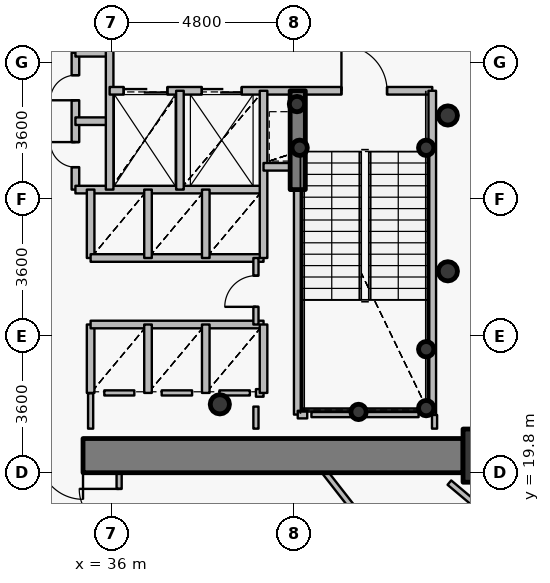
"""IFC4 building model, lengths in metres.
Left out: names, types, materials, properties, quantities, classifications, styles, units other than length and angle.
Written with IfcOpenShell. Run it as: python <this file> out.ifc"""

import sys

from ifc_helpers import new_model, si_unit, direction, frame, frame_2d, origin, origin_2d, place, context, subcontext, project, spatial, rectangle, hollow_circle, extrude, source, transform, mapped, element, fill, save


model = new_model("IFC4")
c1 = context("Model", 3, precision=1e-05, world=origin(), true_north=direction((0.0, 1.0)))
c2 = subcontext(c1, "Body", "Model", "MODEL_VIEW")
j1 = project(units=[si_unit("LENGTHUNIT", "METRE"), si_unit("PLANEANGLEUNIT", "RADIAN")], contexts=[c1])
p1 = place(None, origin())
s1 = spatial("IfcSite", under=j1, at=p1, CompositionType="ELEMENT")
p2 = place(p1, origin())
s2 = spatial("IfcBuilding", under=s1, at=p2, CompositionType="ELEMENT")
p3 = place(p2, frame((0.0, 0.0, 22.8)))
s3 = spatial("IfcBuildingStorey", under=s2, at=p3, CompositionType="ELEMENT", Elevation=22.8)
p4 = place(p3, frame((45.95, 20.25, 0.0), z_axis=(0.0, 0.0, 1.0), x_axis=(1.0, 0.0, 0.0)))
e1 = element("IfcColumn", 1, at=p4, inside=s3, PredefinedType="COLUMN", context=c2, shape_type="SweptSolid", body=[
    extrude(rectangle(XDim=1.4, YDim=1.4, at=origin_2d()), origin(), (0.0, 0.0, 1.0), 4.2),
])
p5 = place(p3, frame((38.85, 21.6, 0.0), z_axis=(0.0, 0.0, 1.0), x_axis=(1.0, 0.0, 0.0)))
e2 = element("IfcColumn", 2, at=p5, inside=s3, PredefinedType="COLUMN", context=c2, shape_type="SweptSolid", body=[
    extrude(hollow_circle(Radius=0.254, WallThickness=0.02, at=origin_2d()), origin(), (0.0, 0.0, 1.0), 4.2),
])
for number, where, z_axis, x_axis in (
    (3, (44.28, 21.5, 0.0), (0.0, 0.0, 1.0), (1.0, 0.0, 0.0)),
    (4, (44.28, 23.05, 0.0), (0.0, 0.0, 1.0), (1.0, 0.0, 0.0)),
    (5, (42.5, 21.4, 0.0), (0.0, 0.0, 1.0), (1.0, 0.0, 0.0)),
    (6, (40.95, 28.35, 0.0), (0.0, 0.0, 1.0), (1.0, 0.0, 0.0)),
    (7, (44.28, 28.35, 0.0), (0.0, 0.0, 1.0), (1.0, 0.0, 0.0)),
    (8, (40.88, 29.5, 0.0), (0.0, 0.0, 1.0), (1.0, 0.0, 0.0)),
):
    element("IfcColumn", number, at=place(p3, frame(where, z_axis=z_axis, x_axis=x_axis)), inside=s3, PredefinedType="COLUMN", context=c2, shape_type="SweptSolid", body=[
        extrude(hollow_circle(Radius=0.203, WallThickness=0.016, at=origin_2d()), origin(), (0.0, 0.0, 1.0), 4.2),
    ])
p6 = place(p3, frame((45.25, 20.25, 0.0), z_axis=(0.0, 0.0, 1.0), x_axis=(-1.0, 0.0, 0.0)))
e9 = element("IfcWall", 9, at=p6, inside=s3, PredefinedType="SHEAR", context=c2, shape_type="SweptSolid", body=[
    extrude(rectangle(XDim=18.5, YDim=0.9, at=frame_2d((9.25, 0.0))), origin(), (0.0, 0.0, 1.0), 3.35),
])
p7 = place(p6, frame((10.0, 0.0, 0.0)))
e10 = element("IfcOpeningElement", 10, at=p7, cuts=e9, PredefinedType="OPENING", context=c2, shape_type="SweptSolid", body=[
    extrude(rectangle(XDim=1.15, YDim=2.15, at=origin_2d()), frame((0.575, 0.46, 1.075), z_axis=(0.0, -1.0, 0.0), x_axis=(1.0, 0.0, 0.0)), (0.0, 0.0, 1.0), 0.92),
])
p8 = place(p3, frame((40.9, 27.25, 0.0), z_axis=(0.0, 0.0, 1.0), x_axis=(0.0, 1.0, 0.0)))
e11 = element("IfcWall", 11, at=p8, inside=s3, PredefinedType="SHEAR", context=c2, shape_type="SweptSolid", body=[
    extrude(rectangle(XDim=2.6, YDim=0.4, at=frame_2d((1.3, 0.0))), origin(), (0.0, 0.0, 1.0), 3.5),
])
for number, where, z_axis, x_axis in (
    (12, (44.85, 25.1, 0.0), (0.0, 0.0, 1.0), (1.0, 0.0, 0.0)),
    (13, (44.85, 29.2, 0.0), (0.0, 0.0, 1.0), (1.0, 0.0, 0.0)),
):
    element("IfcColumn", number, at=place(p3, frame(where, z_axis=z_axis, x_axis=x_axis)), inside=s3, PredefinedType="COLUMN", context=c2, shape_type="SweptSolid", body=[
        extrude(hollow_circle(Radius=0.254, WallThickness=0.02, at=origin_2d()), origin(), (0.0, 0.0, 1.0), 4.2),
    ])
p9 = place(p3, frame((35.05, 27.25, 0.0), z_axis=(0.0, 0.0, 1.0), x_axis=(0.0, 1.0, 0.0)))
e14 = element("IfcWall", 14, at=p9, inside=s3, PredefinedType="PARTITIONING", context=c2, shape_type="SweptSolid", body=[
    extrude(rectangle(XDim=3.6, YDim=0.2, at=frame_2d((1.8, 0.0))), origin(), (0.0, 0.0, 1.0), 3.9),
])
p10 = place(p9, frame((0.59, 0.0, 0.0)))
e15 = element("IfcOpeningElement", 15, at=p10, cuts=e14, PredefinedType="OPENING", context=c2, shape_type="SweptSolid", body=[
    extrude(rectangle(XDim=0.66, YDim=2.05, at=origin_2d()), frame((0.33, 0.11, 1.025), z_axis=(0.0, -1.0, 0.0), x_axis=(1.0, 0.0, 0.0)), (0.0, 0.0, 1.0), 0.22),
])
p11 = place(p9, frame((2.35, 0.0, 0.0)))
e16 = element("IfcOpeningElement", 16, at=p11, cuts=e14, PredefinedType="OPENING", context=c2, shape_type="SweptSolid", body=[
    extrude(rectangle(XDim=0.66, YDim=2.05, at=origin_2d()), frame((0.33, 0.11, 1.025), z_axis=(0.0, -1.0, 0.0), x_axis=(1.0, 0.0, 0.0)), (0.0, 0.0, 1.0), 0.22),
])
p12 = place(p3, frame((35.05, 27.25, 0.0), z_axis=(0.0, 0.0, 1.0), x_axis=(1.0, 0.0, 0.0)))
e17 = element("IfcWall", 17, at=p12, inside=s3, PredefinedType="PARTITIONING", context=c2, shape_type="SweptSolid", body=[
    extrude(rectangle(XDim=4.95, YDim=0.2, at=frame_2d((2.475, 0.0))), origin(), (0.0, 0.0, 1.0), 3.485),
])
for number, where, z_axis, x_axis in (
    (18, (35.05, 29.05, 0.0), (0.0, 0.0, 1.0), (1.0, 0.0, 0.0)),
    (19, (35.05, 30.85, 0.0), (0.0, 0.0, 1.0), (1.0, 0.0, 0.0)),
):
    element("IfcWall", number, at=place(p3, frame(where, z_axis=z_axis, x_axis=x_axis)), inside=s3, PredefinedType="PARTITIONING", context=c2, shape_type="SweptSolid", body=[
        extrude(rectangle(XDim=0.9, YDim=0.2, at=frame_2d((0.45, 0.0))), origin(), (0.0, 0.0, 1.0), 3.9),
    ])
p13 = place(p3, frame((35.45, 21.9, 0.0), z_axis=(0.0, 0.0, 1.0), x_axis=(0.0, 1.0, 0.0)))
e20 = element("IfcWall", 20, at=p13, inside=s3, PredefinedType="PARTITIONING", context=c2, shape_type="SweptSolid", body=[
    extrude(rectangle(XDim=1.8, YDim=0.2, at=frame_2d((0.9, 0.0))), origin(), (0.0, 0.0, 1.0), 3.9),
])
p14 = place(p3, frame((35.45, 23.7, 0.0), z_axis=(0.0, 0.0, 1.0), x_axis=(1.0, 0.0, 0.0)))
e21 = element("IfcWall", 21, at=p14, inside=s3, PredefinedType="PARTITIONING", context=c2, shape_type="SweptSolid", body=[
    extrude(rectangle(XDim=4.55, YDim=0.2, at=frame_2d((2.275, 0.0))), origin(), (0.0, 0.0, 1.0), 3.485),
])
p15 = place(p3, frame((35.45, 25.45, 0.0), z_axis=(0.0, 0.0, 1.0), x_axis=(0.0, 1.0, 0.0)))
e22 = element("IfcWall", 22, at=p15, inside=s3, PredefinedType="PARTITIONING", context=c2, shape_type="SweptSolid", body=[
    extrude(rectangle(XDim=1.8, YDim=0.2, at=frame_2d((0.9, 0.0))), origin(), (0.0, 0.0, 1.0), 3.9),
])
p16 = place(p3, frame((35.45, 25.45, 0.0), z_axis=(0.0, 0.0, 1.0), x_axis=(1.0, 0.0, 0.0)))
e23 = element("IfcWall", 23, at=p16, inside=s3, PredefinedType="PARTITIONING", context=c2, shape_type="SweptSolid", body=[
    extrude(rectangle(XDim=4.55, YDim=0.2, at=frame_2d((2.275, 0.0))), origin(), (0.0, 0.0, 1.0), 3.485),
])
p17 = place(p3, frame((35.95, 27.25, 0.0), z_axis=(0.0, 0.0, 1.0), x_axis=(0.0, 1.0, 0.0)))
e24 = element("IfcWall", 24, at=p17, inside=s3, PredefinedType="PARTITIONING", context=c2, shape_type="SweptSolid", body=[
    extrude(rectangle(XDim=3.8, YDim=0.2, at=frame_2d((1.9, 0.0))), origin(), (0.0, 0.0, 1.0), 3.9),
])
p18 = place(p3, frame((35.95, 29.85, 0.0), z_axis=(0.0, 0.0, 1.0), x_axis=(1.0, 0.0, 0.0)))
e25 = element("IfcWall", 25, at=p18, inside=s3, PredefinedType="PARTITIONING", context=c2, shape_type="SweptSolid", body=[
    extrude(rectangle(XDim=8.49, YDim=0.2, at=frame_2d((4.245, 0.0))), origin(), (0.0, 0.0, 1.0), 3.485),
])
p19 = place(p18, frame((6.1, 0.0, 0.0)))
e26 = element("IfcOpeningElement", 26, at=p19, cuts=e25, PredefinedType="OPENING", context=c2, shape_type="SweptSolid", body=[
    extrude(rectangle(XDim=1.2, YDim=2.15, at=origin_2d()), frame((0.6, 0.11, 1.075), z_axis=(0.0, -1.0, 0.0), x_axis=(1.0, 0.0, 0.0)), (0.0, 0.0, 1.0), 0.22),
])
p20 = place(p18, frame((0.37, 0.0, 0.0)))
e27 = element("IfcOpeningElement", 27, at=p20, cuts=e25, PredefinedType="OPENING", context=c2, shape_type="SweptSolid", body=[
    extrude(rectangle(XDim=1.15, YDim=2.15, at=origin_2d()), frame((0.575, 0.11, 1.075), z_axis=(0.0, -1.0, 0.0), x_axis=(1.0, 0.0, 0.0)), (0.0, 0.0, 1.0), 0.22),
])
p21 = place(p18, frame((2.425, 0.0, 0.0)))
e28 = element("IfcOpeningElement", 28, at=p21, cuts=e25, PredefinedType="OPENING", context=c2, shape_type="SweptSolid", body=[
    extrude(rectangle(XDim=1.05, YDim=2.15, at=origin_2d()), frame((0.525, 0.11, 1.075), z_axis=(0.0, -1.0, 0.0), x_axis=(1.0, 0.0, 0.0)), (0.0, 0.0, 1.0), 0.22),
])
p22 = place(p3, frame((36.2, 17.9, 0.0), z_axis=(0.0, 0.0, 1.0), x_axis=(0.0, 1.0, 0.0)))
e29 = element("IfcWall", 29, at=p22, inside=s3, PredefinedType="PARTITIONING", context=c2, shape_type="SweptSolid", body=[
    extrude(rectangle(XDim=1.9, YDim=0.135, at=frame_2d((0.95, 0.0))), origin(), (0.0, 0.0, 1.0), 2.685),
])
p23 = place(p22, frame((0.425, 0.0, 0.0)))
e30 = element("IfcOpeningElement", 30, at=p23, cuts=e29, PredefinedType="OPENING", context=c2, shape_type="SweptSolid", body=[
    extrude(rectangle(XDim=1.05, YDim=2.15, at=origin_2d()), frame((0.525, 0.078, 1.075), z_axis=(0.0, -1.0, 0.0), x_axis=(1.0, 0.0, 0.0)), (0.0, 0.0, 1.0), 0.155),
])
for number, where, z_axis, x_axis in (
    (31, (36.96, 21.9, 0.0), (0.0, 0.0, 1.0), (0.0, 1.0, 0.0)),
    (32, (36.96, 25.45, 0.0), (0.0, 0.0, 1.0), (0.0, 1.0, 0.0)),
):
    element("IfcWall", number, at=place(p3, frame(where, z_axis=z_axis, x_axis=x_axis)), inside=s3, PredefinedType="PARTITIONING", context=c2, shape_type="SweptSolid", body=[
        extrude(rectangle(XDim=1.8, YDim=0.2, at=frame_2d((0.9, 0.0))), origin(), (0.0, 0.0, 1.0), 3.9),
    ])
p24 = place(p3, frame((37.8, 27.25, 0.0), z_axis=(0.0, 0.0, 1.0), x_axis=(0.0, 1.0, 0.0)))
e33 = element("IfcWall", 33, at=p24, inside=s3, PredefinedType="PARTITIONING", context=c2, shape_type="SweptSolid", body=[
    extrude(rectangle(XDim=2.6, YDim=0.2, at=frame_2d((1.3, 0.0))), origin(), (0.0, 0.0, 1.0), 3.9),
])
for number, where, z_axis, x_axis in (
    (34, (38.48, 21.9, 0.0), (0.0, 0.0, 1.0), (0.0, 1.0, 0.0)),
    (35, (38.48, 25.45, 0.0), (0.0, 0.0, 1.0), (0.0, 1.0, 0.0)),
):
    element("IfcWall", number, at=place(p3, frame(where, z_axis=z_axis, x_axis=x_axis)), inside=s3, PredefinedType="PARTITIONING", context=c2, shape_type="SweptSolid", body=[
        extrude(rectangle(XDim=1.8, YDim=0.2, at=frame_2d((0.9, 0.0))), origin(), (0.0, 0.0, 1.0), 3.9),
    ])
p25 = place(p3, frame((39.8, 21.9, 0.0), z_axis=(0.0, 0.0, 1.0), x_axis=(1.0, 0.0, 0.0)))
e36 = element("IfcWall", 36, at=p25, inside=s3, PredefinedType="PARTITIONING", context=c2, shape_type="SweptSolid", body=[
    extrude(rectangle(XDim=0.2, YDim=0.2, at=frame_2d((0.1, 0.0))), origin(), (0.0, 0.0, 1.0), 3.9),
])
p26 = place(p3, frame((39.8, 23.7, 0.0), z_axis=(0.0, 0.0, 1.0), x_axis=(0.0, 1.0, 0.0)))
e37 = element("IfcWall", 37, at=p26, inside=s3, PredefinedType="PARTITIONING", context=c2, shape_type="SweptSolid", body=[
    extrude(rectangle(XDim=1.75, YDim=0.135, at=frame_2d((0.875, 0.0))), origin(), (0.0, 0.0, 1.0), 3.9),
])
p27 = place(p26, frame((0.465, 0.0, 0.0)))
e38 = element("IfcOpeningElement", 38, at=p27, cuts=e37, PredefinedType="OPENING", context=c2, shape_type="SweptSolid", body=[
    extrude(rectangle(XDim=0.82, YDim=2.1, at=origin_2d()), frame((0.41, 0.078, 1.05), z_axis=(0.0, -1.0, 0.0), x_axis=(1.0, 0.0, 0.0)), (0.0, 0.0, 1.0), 0.155),
])
p28 = place(p3, frame((40.0, 21.9, 0.0), z_axis=(0.0, 0.0, 1.0), x_axis=(0.0, 1.0, 0.0)))
e39 = element("IfcWall", 39, at=p28, inside=s3, PredefinedType="PARTITIONING", context=c2, shape_type="SweptSolid", body=[
    extrude(rectangle(XDim=1.8, YDim=0.2, at=frame_2d((0.9, 0.0))), origin(), (0.0, 0.0, 1.0), 3.9),
])
p29 = place(p3, frame((40.0, 25.45, 0.0), z_axis=(0.0, 0.0, 1.0), x_axis=(0.0, 1.0, 0.0)))
e40 = element("IfcWall", 40, at=p29, inside=s3, PredefinedType="PARTITIONING", context=c2, shape_type="SweptSolid", body=[
    extrude(rectangle(XDim=4.4, YDim=0.2, at=frame_2d((2.2, 0.0))), origin(), (0.0, 0.0, 1.0), 3.9),
])
p30 = place(p3, frame((40.0, 27.85, 0.0), z_axis=(0.0, 0.0, 1.0), x_axis=(1.0, 0.0, 0.0)))
e41 = element("IfcWall", 41, at=p30, inside=s3, PredefinedType="PARTITIONING", context=c2, shape_type="SweptSolid", body=[
    extrude(rectangle(XDim=0.9, YDim=0.2, at=frame_2d((0.45, 0.0))), origin(), (0.0, 0.0, 1.0), 3.9),
])
p31 = place(p3, frame((40.9, 21.33, 0.0), z_axis=(0.0, 0.0, 1.0), x_axis=(0.0, 1.0, 0.0)))
e42 = element("IfcWall", 42, at=p31, inside=s3, PredefinedType="PARTITIONING", context=c2, shape_type="SweptSolid", body=[
    extrude(rectangle(XDim=5.91, YDim=0.2, at=frame_2d((2.955, 0.0))), origin(), (0.0, 0.0, 1.0), 3.435),
])
p32 = place(p3, frame((40.9, 21.33, 0.0), z_axis=(0.0, 0.0, 1.0), x_axis=(1.0, 0.0, 0.0)))
e43 = element("IfcWall", 43, at=p32, inside=s3, PredefinedType="PARTITIONING", context=c2, shape_type="SweptSolid", body=[
    extrude(rectangle(XDim=0.25, YDim=0.2, at=frame_2d((0.125, 0.0))), origin(), (0.0, 0.0, 1.0), 3.435),
])
p33 = place(p3, frame((41.625, 19.8, 0.0), z_axis=(0.0, 0.0, 1.0), x_axis=(0.615657399511, -0.788013937965, 0.0)))
e44 = element("IfcWall", 44, at=p33, inside=s3, PredefinedType="PARTITIONING", context=c2, shape_type="SweptSolid", body=[
    extrude(rectangle(XDim=18.798, YDim=0.15, at=frame_2d((9.399, 0.0))), origin(), (0.0, 0.0, 1.0), 3.085),
])
p34 = place(p33, frame((13.765, 0.0, 0.0)))
e45 = element("IfcOpeningElement", 45, at=p34, cuts=e44, PredefinedType="OPENING", context=c2, shape_type="SweptSolid", body=[
    extrude(rectangle(XDim=1.05, YDim=2.15, at=origin_2d()), frame((0.525, 0.085, 1.075), z_axis=(0.0, -1.0, 0.0), x_axis=(1.0, 0.0, 0.0)), (0.0, 0.0, 1.0), 0.17),
])
p35 = place(p3, frame((44.44, 21.33, 0.0), z_axis=(0.0, 0.0, 1.0), x_axis=(0.0, 1.0, 0.0)))
e46 = element("IfcWall", 46, at=p35, inside=s3, PredefinedType="PARTITIONING", context=c2, shape_type="SweptSolid", body=[
    extrude(rectangle(XDim=8.52, YDim=0.2, at=frame_2d((4.26, 0.0))), origin(), (0.0, 0.0, 1.0), 3.9),
])
p36 = place(p3, frame((44.08, 21.33, 0.0), z_axis=(0.0, 0.0, 1.0), x_axis=(-1.0, 0.0, 0.0)))
e47 = element("IfcWall", 47, at=p36, inside=s3, PredefinedType="PARTITIONING", context=c2, shape_type="SweptSolid", body=[
    extrude(rectangle(XDim=2.82, YDim=0.135, at=frame_2d((1.41, 0.0))), origin(), (0.0, 0.0, 1.0), 3.435),
])
p37 = place(p3, frame((36.6, 21.9, 0.0), z_axis=(0.0, 0.0, 1.0), x_axis=(-1.0, 0.0, 0.0)))
e48 = element("IfcWall", 48, at=p37, inside=s3, PredefinedType="PARTITIONING", context=c2, shape_type="SweptSolid", body=[
    extrude(rectangle(XDim=0.79, YDim=0.135, at=frame_2d((0.395, 0.0))), origin(), (0.0, 0.0, 1.0), 3.9),
])
p38 = place(p3, frame((38.12, 21.9, 0.0), z_axis=(0.0, 0.0, 1.0), x_axis=(-1.0, 0.0, 0.0)))
e49 = element("IfcWall", 49, at=p38, inside=s3, PredefinedType="PARTITIONING", context=c2, shape_type="SweptSolid", body=[
    extrude(rectangle(XDim=0.8, YDim=0.135, at=frame_2d((0.4, 0.0))), origin(), (0.0, 0.0, 1.0), 3.9),
])
p39 = place(p3, frame((39.64, 21.9, 0.0), z_axis=(0.0, 0.0, 1.0), x_axis=(-1.0, 0.0, 0.0)))
e50 = element("IfcWall", 50, at=p39, inside=s3, PredefinedType="PARTITIONING", context=c2, shape_type="SweptSolid", body=[
    extrude(rectangle(XDim=0.8, YDim=0.135, at=frame_2d((0.4, 0.0))), origin(), (0.0, 0.0, 1.0), 3.485),
])
p40 = place(p3, frame((39.8, 20.96, 0.0), z_axis=(0.0, 0.0, 1.0), x_axis=(0.0, 1.0, 0.0)))
e51 = element("IfcWall", 51, at=p40, inside=s3, PredefinedType="PARTITIONING", context=c2, shape_type="SweptSolid", body=[
    extrude(rectangle(XDim=0.58, YDim=0.135, at=frame_2d((0.29, 0.0))), origin(), (0.0, 0.0, 1.0), 3.435),
])
p41 = place(p3, frame((44.5, 20.96, 0.0), z_axis=(0.0, 0.0, 1.0), x_axis=(0.0, 1.0, 0.0)))
e52 = element("IfcWall", 52, at=p41, inside=s3, PredefinedType="PARTITIONING", context=c2, shape_type="SweptSolid", body=[
    extrude(rectangle(XDim=0.36, YDim=0.135, at=frame_2d((0.18, 0.0))), origin(), (0.0, 0.0, 1.0), 3.9),
])
p42 = place(p3, frame((35.45, 21.89, 0.0), z_axis=(0.0, 0.0, 1.0), x_axis=(0.0, -1.0, 0.0)))
e53 = element("IfcWall", 53, at=p42, inside=s3, PredefinedType="PARTITIONING", context=c2, shape_type="SweptSolid", body=[
    extrude(rectangle(XDim=0.93, YDim=0.135, at=frame_2d((0.465, 0.0))), origin(), (0.0, 0.0, 1.0), 3.485),
])
p43 = place(p3, frame((44.89, 19.54, 0.0), z_axis=(0.0, 0.0, 1.0), x_axis=(0.76598583339, -0.642857451576, 0.0)))
e54 = element("IfcWall", 54, at=p43, inside=s3, PredefinedType="PARTITIONING", context=c2, shape_type="SweptSolid", body=[
    extrude(rectangle(XDim=1.112, YDim=0.15, at=frame_2d((0.556, 0.0))), origin(), (0.0, 0.0, 1.0), 3.9),
])
m1 = source(origin(), c2, "Body", "SweptSolid", [
    extrude(rectangle(XDim=1.15, YDim=2.15, at=origin_2d()), frame((0.575, 0.025, 1.075), z_axis=(0.0, -1.0, 0.0), x_axis=(1.0, 0.0, 0.0)), (0.0, 0.0, 1.0), 0.05),
])
p44 = place(p7, origin())
e55 = element("IfcDoor", 55, at=p44, inside=s3, OperationType="SINGLE_SWING_LEFT", PredefinedType="DOOR", context=c2, shape_type="MappedRepresentation", body=[
    mapped(m1, transform((0.0, 0.0, 0.0), x_axis=(1.0, 0.0, 0.0), y_axis=(0.0, 1.0, 0.0), z_axis=(0.0, 0.0, 1.0), scale=1.0)),
])
fill(e10, e55)
m2 = source(origin(), c2, "Body", "SweptSolid", [
    extrude(rectangle(XDim=1.2, YDim=2.15, at=origin_2d()), frame((0.6, 0.025, 1.075), z_axis=(0.0, -1.0, 0.0), x_axis=(1.0, 0.0, 0.0)), (0.0, 0.0, 1.0), 0.05),
])
p45 = place(p19, origin())
e56 = element("IfcDoor", 56, at=p45, inside=s3, OperationType="SINGLE_SWING_LEFT", PredefinedType="DOOR", context=c2, shape_type="MappedRepresentation", body=[
    mapped(m2, transform((0.0, 0.0, 0.0), x_axis=(1.0, 0.0, 0.0), y_axis=(0.0, 1.0, 0.0), z_axis=(0.0, 0.0, 1.0), scale=1.0)),
])
fill(e26, e56)
m3 = source(origin(), c2, "Body", "SweptSolid", [
    extrude(rectangle(XDim=1.15, YDim=2.15, at=origin_2d()), frame((0.575, 0.025, 1.075), z_axis=(0.0, -1.0, 0.0), x_axis=(1.0, 0.0, 0.0)), (0.0, 0.0, 1.0), 0.05),
])
p46 = place(p20, origin())
e57 = element("IfcDoor", 57, at=p46, inside=s3, OperationType="DOUBLE_DOOR_SLIDING", PredefinedType="USERDEFINED", context=c2, shape_type="MappedRepresentation", body=[
    mapped(m3, transform((0.0, 0.0, 0.0), x_axis=(1.0, 0.0, 0.0), y_axis=(0.0, 1.0, 0.0), z_axis=(0.0, 0.0, 1.0), scale=1.0)),
])
fill(e27, e57)
m4 = source(origin(), c2, "Body", "SweptSolid", [
    extrude(rectangle(XDim=1.05, YDim=2.15, at=origin_2d()), frame((0.525, 0.025, 1.075), z_axis=(0.0, -1.0, 0.0), x_axis=(1.0, 0.0, 0.0)), (0.0, 0.0, 1.0), 0.05),
])
p47 = place(p21, origin())
e58 = element("IfcDoor", 58, at=p47, inside=s3, OperationType="DOUBLE_DOOR_SLIDING", PredefinedType="USERDEFINED", context=c2, shape_type="MappedRepresentation", body=[
    mapped(m4, transform((0.0, 0.0, 0.0), x_axis=(1.0, 0.0, 0.0), y_axis=(0.0, 1.0, 0.0), z_axis=(0.0, 0.0, 1.0), scale=1.0)),
])
fill(e28, e58)
m5 = source(origin(), c2, "Body", "SweptSolid", [
    extrude(rectangle(XDim=0.66, YDim=2.05, at=origin_2d()), frame((0.33, 0.025, 1.025), z_axis=(0.0, -1.0, 0.0), x_axis=(1.0, 0.0, 0.0)), (0.0, 0.0, 1.0), 0.05),
])
p48 = place(p10, origin())
e59 = element("IfcDoor", 59, at=p48, inside=s3, OperationType="SINGLE_SWING_RIGHT", PredefinedType="USERDEFINED", context=c2, shape_type="MappedRepresentation", body=[
    mapped(m5, transform((0.0, 0.0, 0.0), x_axis=(1.0, 0.0, 0.0), y_axis=(0.0, 1.0, 0.0), z_axis=(0.0, 0.0, 1.0), scale=1.0)),
])
fill(e15, e59)
p49 = place(p11, origin())
e60 = element("IfcDoor", 60, at=p49, inside=s3, OperationType="SINGLE_SWING_LEFT", PredefinedType="USERDEFINED", context=c2, shape_type="MappedRepresentation", body=[
    mapped(m5, transform((0.0, 0.0, 0.0), x_axis=(1.0, 0.0, 0.0), y_axis=(0.0, 1.0, 0.0), z_axis=(0.0, 0.0, 1.0), scale=1.0)),
])
fill(e16, e60)
m6 = source(origin(), c2, "Body", "SweptSolid", [
    extrude(rectangle(XDim=0.82, YDim=2.1, at=origin_2d()), frame((0.41, 0.025, 1.05), z_axis=(0.0, -1.0, 0.0), x_axis=(1.0, 0.0, 0.0)), (0.0, 0.0, 1.0), 0.05),
])
p50 = place(p27, origin())
e61 = element("IfcDoor", 61, at=p50, inside=s3, OperationType="SINGLE_SWING_LEFT", PredefinedType="DOOR", context=c2, shape_type="MappedRepresentation", body=[
    mapped(m6, transform((0.0, 0.0, 0.0), x_axis=(1.0, 0.0, 0.0), y_axis=(0.0, 1.0, 0.0), z_axis=(0.0, 0.0, 1.0), scale=1.0)),
])
fill(e38, e61)
m7 = source(origin(), c2, "Body", "SweptSolid", [
    extrude(rectangle(XDim=1.05, YDim=2.15, at=origin_2d()), frame((0.525, 0.025, 1.075), z_axis=(0.0, -1.0, 0.0), x_axis=(1.0, 0.0, 0.0)), (0.0, 0.0, 1.0), 0.05),
])
p51 = place(p23, origin())
e62 = element("IfcDoor", 62, at=p51, inside=s3, OperationType="SINGLE_SWING_RIGHT", PredefinedType="DOOR", context=c2, shape_type="MappedRepresentation", body=[
    mapped(m7, transform((0.0, 0.0, 0.0), x_axis=(1.0, 0.0, 0.0), y_axis=(0.0, 1.0, 0.0), z_axis=(0.0, 0.0, 1.0), scale=1.0)),
])
fill(e30, e62)
save(model, sys.argv[1])
